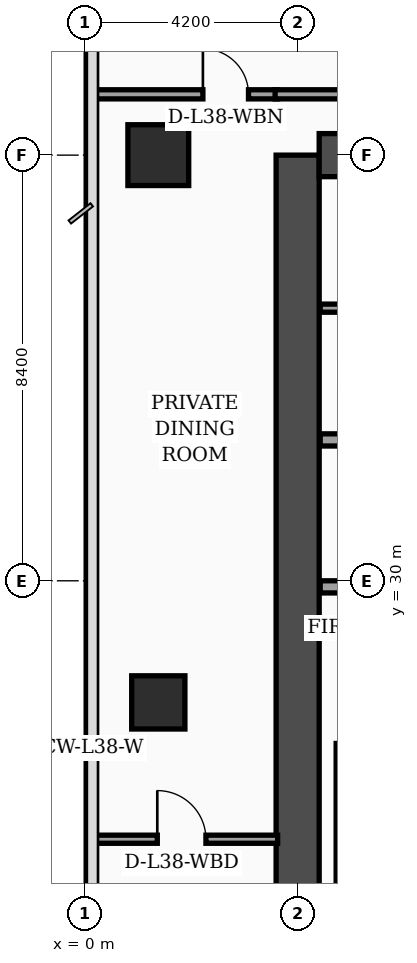
"""IFC4 building model, lengths in metres.
Left out: names, types, materials, properties, quantities, classifications, styles, units other than length and angle.
Written with IfcOpenShell. Run it as: python <this file> out.ifc"""

import sys

from ifc_helpers import new_model, si_unit, direction, frame, frame_2d, origin, origin_2d, place, context, subcontext, project, spatial, rectangle, extrude, element, fill, save


model = new_model("IFC4")
c1 = context("Model", 3, precision=1e-05, world=origin(), true_north=direction((0.0, 1.0)))
c2 = subcontext(c1, "Body", "Model", "MODEL_VIEW")
j1 = project(units=[si_unit("LENGTHUNIT", "METRE"), si_unit("PLANEANGLEUNIT", "RADIAN")], contexts=[c1])
p1 = place(None, origin())
s1 = spatial("IfcSite", under=j1, at=p1, CompositionType="ELEMENT")
p2 = place(p1, origin())
s2 = spatial("IfcBuilding", under=s1, at=p2, CompositionType="ELEMENT")
p3 = place(p2, frame((0.0, 0.0, 156.1)))
s3 = spatial("IfcBuildingStorey", under=s2, at=p3, CompositionType="ELEMENT", Elevation=156.1)
p4 = place(p3, frame((4.2, 16.8, 0.0), z_axis=(0.0, 0.0, 1.0), x_axis=(0.0, 1.0, 0.0)))
e1 = element("IfcWall", 1, at=p4, inside=s3, PredefinedType="SHEAR", context=c2, shape_type="SweptSolid", body=[
    extrude(rectangle(XDim=21.6, YDim=0.85, at=frame_2d((10.8, 0.0))), origin(), (0.0, 0.0, 1.0), 3.56),
])
p5 = place(p3, frame((4.625, 38.4, 0.0), z_axis=(0.0, 0.0, 1.0), x_axis=(1.0, 0.0, 0.0)))
e2 = element("IfcWall", 2, at=p5, inside=s3, PredefinedType="SHEAR", context=c2, shape_type="SweptSolid", body=[
    extrude(rectangle(XDim=9.95, YDim=0.85, at=frame_2d((4.975, 0.0))), origin(), (0.0, 0.0, 1.0), 3.56),
])
p6 = place(p3, frame((5.08, 17.225, 0.0), z_axis=(0.0, 0.0, 1.0), x_axis=(0.0, 1.0, 0.0)))
e3 = element("IfcWall", 3, at=p6, inside=s3, PredefinedType="SOLIDWALL", context=c2, shape_type="SweptSolid", body=[
    extrude(rectangle(XDim=9.565, YDim=0.24, at=frame_2d((4.782, 0.0))), origin(), (0.0, 0.0, 1.0), 3.56),
])
p7 = place(p3, frame((1.45, 27.6, 0.0), z_axis=(0.0, 0.0, 1.0), x_axis=(1.0, 0.0, 0.0)))
e4 = element("IfcColumn", 4, at=p7, inside=s3, PredefinedType="COLUMN", context=c2, shape_type="SweptSolid", body=[
    extrude(rectangle(XDim=1.05, YDim=1.05, at=origin_2d()), origin(), (0.0, 0.0, 1.0), 3.56),
])
p8 = place(p3, frame((1.45, 38.4, 0.0), z_axis=(0.0, 0.0, 1.0), x_axis=(1.0, 0.0, 0.0)))
e5 = element("IfcColumn", 5, at=p8, inside=s3, PredefinedType="COLUMN", context=c2, shape_type="SweptSolid", body=[
    extrude(rectangle(XDim=1.2, YDim=1.2, at=origin_2d()), origin(), (0.0, 0.0, 1.0), 3.56),
])
p9 = place(p3, frame((4.645, 29.88, 0.0), z_axis=(0.0, 0.0, 1.0), x_axis=(1.0, 0.0, 0.0)))
e6 = element("IfcWall", 6, at=p9, inside=s3, PredefinedType="SOLIDWALL", context=c2, shape_type="SweptSolid", body=[
    extrude(rectangle(XDim=4.775, YDim=0.24, at=frame_2d((2.387, 0.0))), origin(), (0.0, 0.0, 1.0), 3.56),
])
p10 = place(p9, frame((0.45, 0.0, 0.0)))
e7 = element("IfcOpeningElement", 7, at=p10, cuts=e6, PredefinedType="OPENING", context=c2, shape_type="SweptSolid", body=[
    extrude(rectangle(XDim=1.3, YDim=2.35, at=frame_2d((0.65, 1.175))), frame((0.0, 0.13, 0.0), z_axis=(0.0, -1.0, 0.0), x_axis=(1.0, 0.0, 0.0)), (0.0, 0.0, 1.0), 0.26),
])
p11 = place(p3, frame((4.645, 32.78, 0.0), z_axis=(0.0, 0.0, 1.0), x_axis=(1.0, 0.0, 0.0)))
e8 = element("IfcWall", 8, at=p11, inside=s3, PredefinedType="SOLIDWALL", context=c2, shape_type="SweptSolid", body=[
    extrude(rectangle(XDim=4.775, YDim=0.24, at=frame_2d((2.387, 0.0))), origin(), (0.0, 0.0, 1.0), 3.19),
])
p12 = place(p3, frame((4.645, 35.38, 0.0), z_axis=(0.0, 0.0, 1.0), x_axis=(1.0, 0.0, 0.0)))
e9 = element("IfcWall", 9, at=p12, inside=s3, PredefinedType="PARTITIONING", context=c2, shape_type="SweptSolid", body=[
    extrude(rectangle(XDim=4.775, YDim=0.16, at=frame_2d((2.387, 0.0))), origin(), (0.0, 0.0, 1.0), 3.56),
])
p13 = place(p12, frame((1.3, 0.0, 0.0)))
e10 = element("IfcOpeningElement", 10, at=p13, cuts=e9, PredefinedType="OPENING", context=c2, shape_type="SweptSolid", body=[
    extrude(rectangle(XDim=0.98, YDim=2.15, at=frame_2d((0.49, 1.075))), frame((0.0, 0.09, 0.0), z_axis=(0.0, -1.0, 0.0), x_axis=(1.0, 0.0, 0.0)), (0.0, 0.0, 1.0), 0.18),
])
p14 = place(p3, frame((0.08, 24.9, 0.0), z_axis=(0.0, 0.0, 1.0), x_axis=(1.0, 0.0, 0.0)))
e11 = element("IfcWall", 11, at=p14, inside=s3, PredefinedType="PARTITIONING", context=c2, shape_type="SweptSolid", body=[
    extrude(rectangle(XDim=3.725, YDim=0.16, at=frame_2d((1.862, 0.0))), origin(), (0.0, 0.0, 1.0), 3.04),
])
p15 = place(p14, frame((1.35, 0.0, 0.0)))
e12 = element("IfcOpeningElement", 12, at=p15, cuts=e11, PredefinedType="OPENING", context=c2, shape_type="SweptSolid", body=[
    extrude(rectangle(XDim=0.96, YDim=2.2, at=frame_2d((0.48, 1.1))), frame((0.0, 0.09, 0.0), z_axis=(0.0, -1.0, 0.0), x_axis=(1.0, 0.0, 0.0)), (0.0, 0.0, 1.0), 0.18),
])
p16 = place(p3, frame((0.08, 39.6, 0.0), z_axis=(0.0, 0.0, 1.0), x_axis=(1.0, 0.0, 0.0)))
e13 = element("IfcWall", 13, at=p16, inside=s3, PredefinedType="PARTITIONING", context=c2, shape_type="SweptSolid", body=[
    extrude(rectangle(XDim=3.725, YDim=0.18, at=frame_2d((1.862, 0.0))), origin(), (0.0, 0.0, 1.0), 2.94),
])
p17 = place(p16, frame((2.25, 0.0, 0.0)))
e14 = element("IfcOpeningElement", 14, at=p17, cuts=e13, PredefinedType="OPENING", context=c2, shape_type="SweptSolid", body=[
    extrude(rectangle(XDim=0.9, YDim=2.15, at=frame_2d((0.45, 1.075))), frame((0.0, 0.1, 0.0), z_axis=(0.0, -1.0, 0.0), x_axis=(1.0, 0.0, 0.0)), (0.0, 0.0, 1.0), 0.2),
])
p18 = place(p3, frame((3.755, 39.6, 0.0), z_axis=(0.0, 0.0, 1.0), x_axis=(1.0, 0.0, 0.0)))
e15 = element("IfcWall", 15, at=p18, inside=s3, PredefinedType="PARTITIONING", context=c2, shape_type="SweptSolid", body=[
    extrude(rectangle(XDim=11.395, YDim=0.18, at=frame_2d((5.698, 0.0))), origin(), (0.0, 0.0, 1.0), 2.94),
])
p19 = place(p15, origin())
e16 = element("IfcDoor", 16, at=p19, inside=s3, OperationType="SINGLE_SWING_LEFT", PredefinedType="DOOR", context=c2, shape_type="SweptSolid", body=[
    extrude(rectangle(XDim=0.96, YDim=2.2, at=frame_2d((0.48, 1.1))), frame((0.0, 0.025, 0.0), z_axis=(0.0, -1.0, 0.0), x_axis=(1.0, 0.0, 0.0)), (0.0, 0.0, 1.0), 0.05),
])
fill(e12, e16)
p20 = place(p17, origin())
e17 = element("IfcDoor", 17, at=p20, inside=s3, OperationType="SINGLE_SWING_LEFT", PredefinedType="DOOR", context=c2, shape_type="SweptSolid", body=[
    extrude(rectangle(XDim=0.9, YDim=2.15, at=frame_2d((0.45, 1.075))), frame((0.0, 0.025, 0.0), z_axis=(0.0, -1.0, 0.0), x_axis=(1.0, 0.0, 0.0)), (0.0, 0.0, 1.0), 0.05),
])
fill(e14, e17)
save(model, sys.argv[1])
